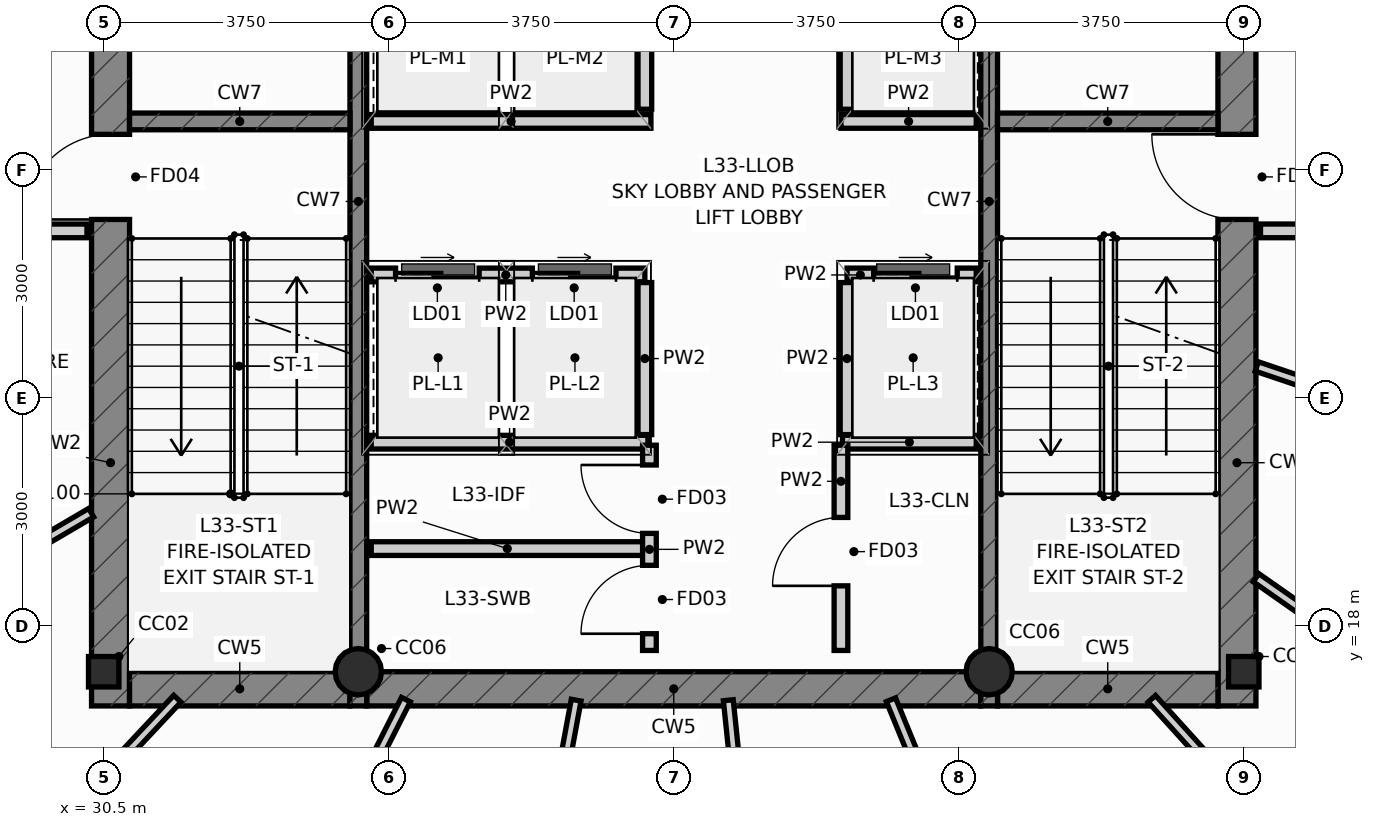
"""IFC4 building model, lengths in metres.
Left out: names, types, materials, properties, quantities, classifications, styles, units other than length and angle.
Written with IfcOpenShell. Run it as: python <this file> out.ifc"""

import sys

from ifc_helpers import new_model, si_unit, direction, frame, frame_2d, origin, origin_2d, place, context, subcontext, project, spatial, rectangle, hollow_circle, i_section, extrude, source, transform, mapped, element, fill, save


model = new_model("IFC4")
c1 = context("Model", 3, precision=1e-05, world=origin(), true_north=direction((0.0, 1.0)))
c2 = subcontext(c1, "Body", "Model", "MODEL_VIEW")
j1 = project(units=[si_unit("LENGTHUNIT", "METRE"), si_unit("PLANEANGLEUNIT", "RADIAN")], contexts=[c1])
p1 = place(None, origin())
s1 = spatial("IfcSite", under=j1, at=p1, CompositionType="ELEMENT")
p2 = place(p1, origin())
s2 = spatial("IfcBuilding", under=s1, at=p2, CompositionType="ELEMENT")
p3 = place(p2, frame((0.0, 0.0, 127.3)))
s3 = spatial("IfcBuildingStorey", under=s2, at=p3, CompositionType="ELEMENT", Elevation=127.3)
m1 = source(origin(), c2, "Body", "SweptSolid", [
    extrude(i_section(OverallWidth=0.4, OverallDepth=0.4, WebThickness=0.02, FlangeThickness=0.032, at=origin_2d()), origin(), (0.0, 0.0, 1.0), 4.5),
])
for number, where, z_axis, x_axis in (
    (1, (30.5, 17.4, 0.0), (0.0, 0.0, 1.0), (1.0, 0.0, 0.0)),
    (2, (45.5, 17.4, 0.0), (0.0, 0.0, 1.0), (1.0, 0.0, 0.0)),
):
    element("IfcColumn", number, at=place(p3, frame(where, z_axis=z_axis, x_axis=x_axis)), inside=s3, PredefinedType="COLUMN", context=c2, shape_type="MappedRepresentation", body=[
        mapped(m1, transform((0.0, 0.0, 0.0), scale=1.0)),
    ])
m2 = source(origin(), c2, "Body", "SweptSolid", [
    extrude(hollow_circle(Radius=0.305, WallThickness=0.025, at=origin_2d()), origin(), (0.0, 0.0, 1.0), 4.5),
])
for number, where, z_axis, x_axis in (
    (3, (33.85, 17.4, 0.0), (0.0, 0.0, 1.0), (1.0, 0.0, 0.0)),
    (4, (42.15, 17.4, 0.0), (0.0, 0.0, 1.0), (1.0, 0.0, 0.0)),
):
    element("IfcColumn", number, at=place(p3, frame(where, z_axis=z_axis, x_axis=x_axis)), inside=s3, PredefinedType="COLUMN", context=c2, shape_type="MappedRepresentation", body=[
        mapped(m2, transform((0.0, 0.0, 0.0), scale=1.0)),
    ])
p4 = place(p3, frame((30.59, 16.95, 0.0), z_axis=(0.0, 0.0, 1.0), x_axis=(0.0, 1.0, 0.0)))
e5 = element("IfcWall", 5, at=p4, inside=s3, PredefinedType="SHEAR", context=c2, shape_type="SweptSolid", body=[
    extrude(rectangle(XDim=13.275, YDim=0.5, at=frame_2d((6.638, 0.0))), origin(), (0.0, 0.0, 1.0), 4.5),
])
p5 = place(p4, frame((6.4, 0.0, 0.0)))
e6 = element("IfcOpeningElement", 6, at=p5, cuts=e5, PredefinedType="OPENING", context=c2, shape_type="SweptSolid", body=[
    extrude(rectangle(XDim=1.12, YDim=2.15, at=frame_2d((0.56, 1.075))), frame((0.0, 0.262, 0.0), z_axis=(0.0, -1.0, 0.0), x_axis=(1.0, 0.0, 0.0)), (0.0, 0.0, 1.0), 0.524),
])
p6 = place(p4, frame((10.85, 0.0, 0.0)))
e7 = element("IfcOpeningElement", 7, at=p6, cuts=e5, PredefinedType="OPENING", context=c2, shape_type="SweptSolid", body=[
    extrude(rectangle(XDim=1.2, YDim=2.2, at=frame_2d((0.6, 1.1))), frame((0.0, 0.262, 0.0), z_axis=(0.0, -1.0, 0.0), x_axis=(1.0, 0.0, 0.0)), (0.0, 0.0, 1.0), 0.524),
])
p7 = place(p3, frame((45.41, 16.95, 0.0), z_axis=(0.0, 0.0, 1.0), x_axis=(0.0, 1.0, 0.0)))
e8 = element("IfcWall", 8, at=p7, inside=s3, PredefinedType="SHEAR", context=c2, shape_type="SweptSolid", body=[
    extrude(rectangle(XDim=13.275, YDim=0.5, at=frame_2d((6.638, 0.0))), origin(), (0.0, 0.0, 1.0), 4.5),
])
p8 = place(p7, frame((6.4, 0.0, 0.0)))
e9 = element("IfcOpeningElement", 9, at=p8, cuts=e8, PredefinedType="OPENING", context=c2, shape_type="SweptSolid", body=[
    extrude(rectangle(XDim=1.12, YDim=2.15, at=frame_2d((0.56, 1.075))), frame((0.0, 0.262, 0.0), z_axis=(0.0, -1.0, 0.0), x_axis=(1.0, 0.0, 0.0)), (0.0, 0.0, 1.0), 0.524),
])
p9 = place(p7, frame((10.85, 0.0, 0.0)))
e10 = element("IfcOpeningElement", 10, at=p9, cuts=e8, PredefinedType="OPENING", context=c2, shape_type="SweptSolid", body=[
    extrude(rectangle(XDim=1.2, YDim=2.2, at=frame_2d((0.6, 1.1))), frame((0.0, 0.262, 0.0), z_axis=(0.0, -1.0, 0.0), x_axis=(1.0, 0.0, 0.0)), (0.0, 0.0, 1.0), 0.524),
])
p10 = place(p3, frame((30.84, 17.175, 0.0), z_axis=(0.0, 0.0, 1.0), x_axis=(1.0, 0.0, 0.0)))
e11 = element("IfcWall", 11, at=p10, inside=s3, PredefinedType="SHEAR", context=c2, shape_type="SweptSolid", body=[
    extrude(rectangle(XDim=2.9, YDim=0.45, at=frame_2d((1.45, 0.0))), origin(), (0.0, 0.0, 1.0), 4.5),
])
p11 = place(p3, frame((33.96, 17.175, 0.0), z_axis=(0.0, 0.0, 1.0), x_axis=(1.0, 0.0, 0.0)))
e12 = element("IfcWall", 12, at=p11, inside=s3, PredefinedType="SHEAR", context=c2, shape_type="SweptSolid", body=[
    extrude(rectangle(XDim=8.08, YDim=0.45, at=frame_2d((4.04, 0.0))), origin(), (0.0, 0.0, 1.0), 4.5),
])
p12 = place(p3, frame((42.26, 17.175, 0.0), z_axis=(0.0, 0.0, 1.0), x_axis=(1.0, 0.0, 0.0)))
e13 = element("IfcWall", 13, at=p12, inside=s3, PredefinedType="SHEAR", context=c2, shape_type="SweptSolid", body=[
    extrude(rectangle(XDim=2.9, YDim=0.45, at=frame_2d((1.45, 0.0))), origin(), (0.0, 0.0, 1.0), 4.5),
])
for number, where, z_axis, x_axis in (
    (14, (33.85, 16.95, 0.0), (0.0, 0.0, 1.0), (0.0, 1.0, 0.0)),
    (15, (42.15, 16.95, 0.0), (0.0, 0.0, 1.0), (0.0, 1.0, 0.0)),
):
    element("IfcWall", number, at=place(p3, frame(where, z_axis=z_axis, x_axis=x_axis)), inside=s3, PredefinedType="SHEAR", context=c2, shape_type="SweptSolid", body=[
        extrude(rectangle(XDim=13.275, YDim=0.22, at=frame_2d((6.638, 0.0))), origin(), (0.0, 0.0, 1.0), 4.5),
    ])
for number, where, z_axis, x_axis in (
    (16, (30.84, 24.64, 0.0), (0.0, 0.0, 1.0), (1.0, 0.0, 0.0)),
    (17, (42.26, 24.64, 0.0), (0.0, 0.0, 1.0), (1.0, 0.0, 0.0)),
):
    element("IfcWall", number, at=place(p3, frame(where, z_axis=z_axis, x_axis=x_axis)), inside=s3, PredefinedType="SHEAR", context=c2, shape_type="SweptSolid", body=[
        extrude(rectangle(XDim=2.9, YDim=0.22, at=frame_2d((1.45, 0.0))), origin(), (0.0, 0.0, 1.0), 4.5),
    ])
p13 = place(p3, frame((34.02, 22.62, 0.0), z_axis=(0.0, 0.0, 1.0), x_axis=(1.0, 0.0, 0.0)))
e18 = element("IfcWall", 18, at=p13, inside=s3, PredefinedType="PARTITIONING", context=c2, shape_type="SweptSolid", body=[
    extrude(rectangle(XDim=3.6, YDim=0.18, at=frame_2d((1.8, 0.0))), origin(), (0.0, 0.0, 1.0), 4.25),
])
p14 = place(p13, frame((0.32, 0.0, 0.0)))
e19 = element("IfcOpeningElement", 19, at=p14, cuts=e18, PredefinedType="OPENING", context=c2, shape_type="SweptSolid", body=[
    extrude(rectangle(XDim=1.1, YDim=2.2, at=frame_2d((0.55, 1.1))), frame((0.0, 0.102, 0.0), z_axis=(0.0, -1.0, 0.0), x_axis=(1.0, 0.0, 0.0)), (0.0, 0.0, 1.0), 0.204),
])
p15 = place(p13, frame((2.12, 0.0, 0.0)))
e20 = element("IfcOpeningElement", 20, at=p15, cuts=e18, PredefinedType="OPENING", context=c2, shape_type="SweptSolid", body=[
    extrude(rectangle(XDim=1.1, YDim=2.2, at=frame_2d((0.55, 1.1))), frame((0.0, 0.102, 0.0), z_axis=(0.0, -1.0, 0.0), x_axis=(1.0, 0.0, 0.0)), (0.0, 0.0, 1.0), 0.204),
])
p16 = place(p3, frame((40.28, 22.62, 0.0), z_axis=(0.0, 0.0, 1.0), x_axis=(1.0, 0.0, 0.0)))
e21 = element("IfcWall", 21, at=p16, inside=s3, PredefinedType="PARTITIONING", context=c2, shape_type="SweptSolid", body=[
    extrude(rectangle(XDim=1.7, YDim=0.18, at=frame_2d((0.85, 0.0))), origin(), (0.0, 0.0, 1.0), 4.25),
])
p17 = place(p16, frame((0.35, 0.0, 0.0)))
e22 = element("IfcOpeningElement", 22, at=p17, cuts=e21, PredefinedType="OPENING", context=c2, shape_type="SweptSolid", body=[
    extrude(rectangle(XDim=1.1, YDim=2.2, at=frame_2d((0.55, 1.1))), frame((0.0, 0.102, 0.0), z_axis=(0.0, -1.0, 0.0), x_axis=(1.0, 0.0, 0.0)), (0.0, 0.0, 1.0), 0.204),
])
for number, where, z_axis, x_axis in (
    (23, (37.62, 20.52, 0.0), (0.0, 0.0, 1.0), (0.0, 1.0, 0.0)),
    (24, (40.28, 20.52, 0.0), (0.0, 0.0, 1.0), (0.0, 1.0, 0.0)),
    (25, (37.62, 24.8, 0.0), (0.0, 0.0, 1.0), (0.0, 1.0, 0.0)),
    (26, (40.28, 24.8, 0.0), (0.0, 0.0, 1.0), (0.0, 1.0, 0.0)),
):
    element("IfcWall", number, at=place(p3, frame(where, z_axis=z_axis, x_axis=x_axis)), inside=s3, PredefinedType="PARTITIONING", context=c2, shape_type="SweptSolid", body=[
        extrude(rectangle(XDim=2.0, YDim=0.18, at=frame_2d((1.0, 0.0))), origin(), (0.0, 0.0, 1.0), 4.25),
    ])
p18 = place(p3, frame((34.02, 24.64, 0.0), z_axis=(0.0, 0.0, 1.0), x_axis=(1.0, 0.0, 0.0)))
e27 = element("IfcWall", 27, at=p18, inside=s3, PredefinedType="PARTITIONING", context=c2, shape_type="SweptSolid", body=[
    extrude(rectangle(XDim=3.68, YDim=0.18, at=frame_2d((1.84, 0.0))), origin(), (0.0, 0.0, 1.0), 4.25),
])
p19 = place(p3, frame((40.2, 24.64, 0.0), z_axis=(0.0, 0.0, 1.0), x_axis=(1.0, 0.0, 0.0)))
e28 = element("IfcWall", 28, at=p19, inside=s3, PredefinedType="PARTITIONING", context=c2, shape_type="SweptSolid", body=[
    extrude(rectangle(XDim=1.78, YDim=0.18, at=frame_2d((0.89, 0.0))), origin(), (0.0, 0.0, 1.0), 4.25),
])
for number, where, z_axis, x_axis in (
    (29, (27.52, 23.2, 0.0), (0.0, 0.0, 1.0), (1.0, 0.0, 0.0)),
    (30, (45.72, 23.2, 0.0), (0.0, 0.0, 1.0), (1.0, 0.0, 0.0)),
):
    element("IfcWall", number, at=place(p3, frame(where, z_axis=z_axis, x_axis=x_axis)), inside=s3, PredefinedType="PARTITIONING", context=c2, shape_type="SweptSolid", body=[
        extrude(rectangle(XDim=2.76, YDim=0.18, at=frame_2d((1.38, 0.0))), origin(), (0.0, 0.0, 1.0), 4.25),
    ])
p20 = place(p3, frame((34.02, 20.42, 0.0), z_axis=(0.0, 0.0, 1.0), x_axis=(1.0, 0.0, 0.0)))
e31 = element("IfcWall", 31, at=p20, inside=s3, PredefinedType="PARTITIONING", context=c2, shape_type="SweptSolid", body=[
    extrude(rectangle(XDim=3.64, YDim=0.18, at=frame_2d((1.82, 0.0))), origin(), (0.0, 0.0, 1.0), 4.25),
])
p21 = place(p3, frame((40.22, 20.42, 0.0), z_axis=(0.0, 0.0, 1.0), x_axis=(1.0, 0.0, 0.0)))
e32 = element("IfcWall", 32, at=p21, inside=s3, PredefinedType="PARTITIONING", context=c2, shape_type="SweptSolid", body=[
    extrude(rectangle(XDim=1.76, YDim=0.18, at=frame_2d((0.88, 0.0))), origin(), (0.0, 0.0, 1.0), 4.25),
])
p22 = place(p3, frame((34.02, 19.02, 0.0), z_axis=(0.0, 0.0, 1.0), x_axis=(1.0, 0.0, 0.0)))
e33 = element("IfcWall", 33, at=p22, inside=s3, PredefinedType="PARTITIONING", context=c2, shape_type="SweptSolid", body=[
    extrude(rectangle(XDim=3.58, YDim=0.18, at=frame_2d((1.79, 0.0))), origin(), (0.0, 0.0, 1.0), 4.25),
])
p23 = place(p3, frame((37.68, 17.68, 0.0), z_axis=(0.0, 0.0, 1.0), x_axis=(0.0, 1.0, 0.0)))
e34 = element("IfcWall", 34, at=p23, inside=s3, PredefinedType="PARTITIONING", context=c2, shape_type="SweptSolid", body=[
    extrude(rectangle(XDim=2.7, YDim=0.18, at=frame_2d((1.35, 0.0))), origin(), (0.0, 0.0, 1.0), 4.25),
])
p24 = place(p23, frame((0.22, 0.0, 0.0)))
e35 = element("IfcOpeningElement", 35, at=p24, cuts=e34, PredefinedType="OPENING", context=c2, shape_type="SweptSolid", body=[
    extrude(rectangle(XDim=0.9, YDim=2.1, at=frame_2d((0.45, 1.05))), frame((0.0, 0.102, 0.0), z_axis=(0.0, -1.0, 0.0), x_axis=(1.0, 0.0, 0.0)), (0.0, 0.0, 1.0), 0.204),
])
p25 = place(p23, frame((1.54, 0.0, 0.0)))
e36 = element("IfcOpeningElement", 36, at=p25, cuts=e34, PredefinedType="OPENING", context=c2, shape_type="SweptSolid", body=[
    extrude(rectangle(XDim=0.9, YDim=2.1, at=frame_2d((0.45, 1.05))), frame((0.0, 0.102, 0.0), z_axis=(0.0, -1.0, 0.0), x_axis=(1.0, 0.0, 0.0)), (0.0, 0.0, 1.0), 0.204),
])
p26 = place(p3, frame((40.2, 17.68, 0.0), z_axis=(0.0, 0.0, 1.0), x_axis=(0.0, 1.0, 0.0)))
e37 = element("IfcWall", 37, at=p26, inside=s3, PredefinedType="PARTITIONING", context=c2, shape_type="SweptSolid", body=[
    extrude(rectangle(XDim=2.7, YDim=0.18, at=frame_2d((1.35, 0.0))), origin(), (0.0, 0.0, 1.0), 4.25),
])
p27 = place(p26, frame((0.85, 0.0, 0.0)))
e38 = element("IfcOpeningElement", 38, at=p27, cuts=e37, PredefinedType="OPENING", context=c2, shape_type="SweptSolid", body=[
    extrude(rectangle(XDim=0.9, YDim=2.1, at=frame_2d((0.45, 1.05))), frame((0.0, 0.102, 0.0), z_axis=(0.0, -1.0, 0.0), x_axis=(1.0, 0.0, 0.0)), (0.0, 0.0, 1.0), 0.204),
])
p28 = place(p3, frame((45.671, 21.416, 0.0), z_axis=(0.0, 0.0, 1.0), x_axis=(0.947472988425, -0.319835795691, 0.0)))
e39 = element("IfcWall", 39, at=p28, inside=s3, PredefinedType="PARTITIONING", context=c2, shape_type="SweptSolid", body=[
    extrude(rectangle(XDim=18.887, YDim=0.13, at=frame_2d((9.444, 0.0))), origin(), (0.0, 0.0, 1.0), 4.25),
])
p29 = place(p28, frame((9.034, 0.0, 0.0)))
e40 = element("IfcOpeningElement", 40, at=p29, cuts=e39, PredefinedType="OPENING", context=c2, shape_type="SweptSolid", body=[
    extrude(rectangle(XDim=0.96, YDim=2.15, at=frame_2d((0.48, 1.075))), frame((0.0, 0.077, 0.0), z_axis=(0.0, -1.0, 0.0), x_axis=(1.0, 0.0, 0.0)), (0.0, 0.0, 1.0), 0.154),
])
p30 = place(p3, frame((45.661, 18.637, 0.0), z_axis=(0.0, 0.0, 1.0), x_axis=(0.819078192958, -0.573681892533, 0.0)))
e41 = element("IfcWall", 41, at=p30, inside=s3, PredefinedType="PARTITIONING", context=c2, shape_type="SweptSolid", body=[
    extrude(rectangle(XDim=17.313, YDim=0.13, at=frame_2d((8.656, 0.0))), origin(), (0.0, 0.0, 1.0), 4.25),
])
p31 = place(p3, frame((20.781, 5.646, 0.0), z_axis=(0.0, 0.0, 1.0), x_axis=(0.684024279875, 0.729459241179, 0.0)))
e42 = element("IfcWall", 42, at=p31, inside=s3, PredefinedType="PARTITIONING", context=c2, shape_type="SweptSolid", body=[
    extrude(rectangle(XDim=15.626, YDim=0.13, at=frame_2d((7.813, 0.0))), origin(), (0.0, 0.0, 1.0), 3.775),
])
p32 = place(p31, frame((7.399, 0.0, 0.0)))
e43 = element("IfcOpeningElement", 43, at=p32, cuts=e42, PredefinedType="OPENING", context=c2, shape_type="SweptSolid", body=[
    extrude(rectangle(XDim=0.96, YDim=2.15, at=frame_2d((0.48, 1.075))), frame((0.0, 0.077, 0.0), z_axis=(0.0, -1.0, 0.0), x_axis=(1.0, 0.0, 0.0)), (0.0, 0.0, 1.0), 0.154),
])
p33 = place(p3, frame((44.29, 17.044, 0.0), z_axis=(0.0, 0.0, 1.0), x_axis=(0.670937503188, -0.74151390197, 0.0)))
e44 = element("IfcWall", 44, at=p33, inside=s3, PredefinedType="PARTITIONING", context=c2, shape_type="SweptSolid", body=[
    extrude(rectangle(XDim=14.806, YDim=0.13, at=frame_2d((7.403, 0.0))), origin(), (0.0, 0.0, 1.0), 3.775),
])
p34 = place(p33, frame((6.987, 0.0, 0.0)))
e45 = element("IfcOpeningElement", 45, at=p34, cuts=e44, PredefinedType="OPENING", context=c2, shape_type="SweptSolid", body=[
    extrude(rectangle(XDim=0.96, YDim=2.15, at=frame_2d((0.48, 1.075))), frame((0.0, 0.077, 0.0), z_axis=(0.0, -1.0, 0.0), x_axis=(1.0, 0.0, 0.0)), (0.0, 0.0, 1.0), 0.154),
])
p35 = place(p3, frame((28.769, 5.747, 0.0), z_axis=(0.0, 0.0, 1.0), x_axis=(0.451262780951, 0.892391115223, 0.0)))
e46 = element("IfcWall", 46, at=p35, inside=s3, PredefinedType="PARTITIONING", context=c2, shape_type="SweptSolid", body=[
    extrude(rectangle(XDim=12.647, YDim=0.13, at=frame_2d((6.324, 0.0))), origin(), (0.0, 0.0, 1.0), 4.25),
])
p36 = place(p35, frame((5.898, 0.0, 0.0)))
e47 = element("IfcOpeningElement", 47, at=p36, cuts=e46, PredefinedType="OPENING", context=c2, shape_type="SweptSolid", body=[
    extrude(rectangle(XDim=0.96, YDim=2.15, at=frame_2d((0.48, 1.075))), frame((0.0, 0.077, 0.0), z_axis=(0.0, -1.0, 0.0), x_axis=(1.0, 0.0, 0.0)), (0.0, 0.0, 1.0), 0.154),
])
p37 = place(p3, frame((40.858, 17.031, 0.0), z_axis=(0.0, 0.0, 1.0), x_axis=(0.37877899571, -0.925487154103, 0.0)))
e48 = element("IfcWall", 48, at=p37, inside=s3, PredefinedType="PARTITIONING", context=c2, shape_type="SweptSolid", body=[
    extrude(rectangle(XDim=11.968, YDim=0.13, at=frame_2d((5.984, 0.0))), origin(), (0.0, 0.0, 1.0), 4.25),
])
p38 = place(p37, frame((5.555, 0.0, 0.0)))
e49 = element("IfcOpeningElement", 49, at=p38, cuts=e48, PredefinedType="OPENING", context=c2, shape_type="SweptSolid", body=[
    extrude(rectangle(XDim=0.96, YDim=2.15, at=frame_2d((0.48, 1.075))), frame((0.0, 0.077, 0.0), z_axis=(0.0, -1.0, 0.0), x_axis=(1.0, 0.0, 0.0)), (0.0, 0.0, 1.0), 0.154),
])
p39 = place(p3, frame((34.648, 5.82, 0.0), z_axis=(0.0, 0.0, 1.0), x_axis=(0.181454718714, 0.983399300923, 0.0)))
e50 = element("IfcWall", 50, at=p39, inside=s3, PredefinedType="PARTITIONING", context=c2, shape_type="SweptSolid", body=[
    extrude(rectangle(XDim=11.395, YDim=0.13, at=frame_2d((5.697, 0.0))), origin(), (0.0, 0.0, 1.0), 4.25),
])
p40 = place(p39, frame((5.268, 0.0, 0.0)))
e51 = element("IfcOpeningElement", 51, at=p40, cuts=e50, PredefinedType="OPENING", context=c2, shape_type="SweptSolid", body=[
    extrude(rectangle(XDim=0.96, YDim=2.15, at=frame_2d((0.48, 1.075))), frame((0.0, 0.077, 0.0), z_axis=(0.0, -1.0, 0.0), x_axis=(1.0, 0.0, 0.0)), (0.0, 0.0, 1.0), 0.154),
])
p41 = place(p3, frame((38.718, 17.025, 0.0), z_axis=(0.0, 0.0, 1.0), x_axis=(0.102876837546, -0.994694101871, 0.0)))
e52 = element("IfcWall", 52, at=p41, inside=s3, PredefinedType="PARTITIONING", context=c2, shape_type="SweptSolid", body=[
    extrude(rectangle(XDim=11.199, YDim=0.13, at=frame_2d((5.599, 0.0))), origin(), (0.0, 0.0, 1.0), 4.25),
])
p42 = place(p41, frame((5.167, 0.0, 0.0)))
e53 = element("IfcOpeningElement", 53, at=p42, cuts=e52, PredefinedType="OPENING", context=c2, shape_type="SweptSolid", body=[
    extrude(rectangle(XDim=0.96, YDim=2.15, at=frame_2d((0.48, 1.075))), frame((0.0, 0.077, 0.0), z_axis=(0.0, -1.0, 0.0), x_axis=(1.0, 0.0, 0.0)), (0.0, 0.0, 1.0), 0.154),
])
p43 = place(p3, frame((27.404, 17.773, 0.0), z_axis=(0.0, 0.0, 1.0), x_axis=(0.86258552872, 0.505911262617, 0.0)))
e54 = element("IfcWall", 54, at=p43, inside=s3, PredefinedType="PARTITIONING", context=c2, shape_type="SweptSolid", body=[
    extrude(rectangle(XDim=3.398, YDim=0.13, at=frame_2d((1.699, 0.0))), origin(), (0.0, 0.0, 1.0), 4.25),
])
p44 = place(p5, origin())
e55 = element("IfcDoor", 55, at=p44, inside=s3, OperationType="SINGLE_SWING_LEFT", PredefinedType="DOOR", context=c2, shape_type="SweptSolid", body=[
    extrude(rectangle(XDim=1.12, YDim=2.15, at=frame_2d((0.56, 1.075))), frame((0.0, 0.025, 0.0), z_axis=(0.0, -1.0, 0.0), x_axis=(1.0, 0.0, 0.0)), (0.0, 0.0, 1.0), 0.05),
])
fill(e6, e55)
p45 = place(p8, origin())
e56 = element("IfcDoor", 56, at=p45, inside=s3, OperationType="SINGLE_SWING_RIGHT", PredefinedType="DOOR", context=c2, shape_type="SweptSolid", body=[
    extrude(rectangle(XDim=1.12, YDim=2.15, at=frame_2d((0.56, 1.075))), frame((0.0, 0.025, 0.0), z_axis=(0.0, -1.0, 0.0), x_axis=(1.0, 0.0, 0.0)), (0.0, 0.0, 1.0), 0.05),
])
fill(e9, e56)
p46 = place(p14, origin())
e57 = element("IfcDoor", 57, at=p46, inside=s3, OperationType="SLIDING_TO_LEFT", PredefinedType="DOOR", context=c2, shape_type="SweptSolid", body=[
    extrude(rectangle(XDim=1.1, YDim=2.2, at=frame_2d((0.55, 1.1))), frame((0.0, 0.025, 0.0), z_axis=(0.0, -1.0, 0.0), x_axis=(1.0, 0.0, 0.0)), (0.0, 0.0, 1.0), 0.05),
])
fill(e19, e57)
p47 = place(p15, origin())
e58 = element("IfcDoor", 58, at=p47, inside=s3, OperationType="SLIDING_TO_RIGHT", PredefinedType="DOOR", context=c2, shape_type="SweptSolid", body=[
    extrude(rectangle(XDim=1.1, YDim=2.2, at=frame_2d((0.55, 1.1))), frame((0.0, 0.025, 0.0), z_axis=(0.0, -1.0, 0.0), x_axis=(1.0, 0.0, 0.0)), (0.0, 0.0, 1.0), 0.05),
])
fill(e20, e58)
p48 = place(p17, origin())
e59 = element("IfcDoor", 59, at=p48, inside=s3, OperationType="SLIDING_TO_LEFT", PredefinedType="DOOR", context=c2, shape_type="SweptSolid", body=[
    extrude(rectangle(XDim=1.1, YDim=2.2, at=frame_2d((0.55, 1.1))), frame((0.0, 0.025, 0.0), z_axis=(0.0, -1.0, 0.0), x_axis=(1.0, 0.0, 0.0)), (0.0, 0.0, 1.0), 0.05),
])
fill(e22, e59)
p49 = place(p24, origin())
e60 = element("IfcDoor", 60, at=p49, inside=s3, OperationType="SINGLE_SWING_LEFT", PredefinedType="DOOR", context=c2, shape_type="SweptSolid", body=[
    extrude(rectangle(XDim=0.9, YDim=2.1, at=frame_2d((0.45, 1.05))), frame((0.0, 0.025, 0.0), z_axis=(0.0, -1.0, 0.0), x_axis=(1.0, 0.0, 0.0)), (0.0, 0.0, 1.0), 0.05),
])
fill(e35, e60)
p50 = place(p25, origin())
e61 = element("IfcDoor", 61, at=p50, inside=s3, OperationType="SINGLE_SWING_RIGHT", PredefinedType="DOOR", context=c2, shape_type="SweptSolid", body=[
    extrude(rectangle(XDim=0.9, YDim=2.1, at=frame_2d((0.45, 1.05))), frame((0.0, 0.025, 0.0), z_axis=(0.0, -1.0, 0.0), x_axis=(1.0, 0.0, 0.0)), (0.0, 0.0, 1.0), 0.05),
])
fill(e36, e61)
p51 = place(p27, origin())
e62 = element("IfcDoor", 62, at=p51, inside=s3, OperationType="SINGLE_SWING_LEFT", PredefinedType="DOOR", context=c2, shape_type="SweptSolid", body=[
    extrude(rectangle(XDim=0.9, YDim=2.1, at=frame_2d((0.45, 1.05))), frame((0.0, 0.025, 0.0), z_axis=(0.0, -1.0, 0.0), x_axis=(1.0, 0.0, 0.0)), (0.0, 0.0, 1.0), 0.05),
])
fill(e38, e62)
save(model, sys.argv[1])
